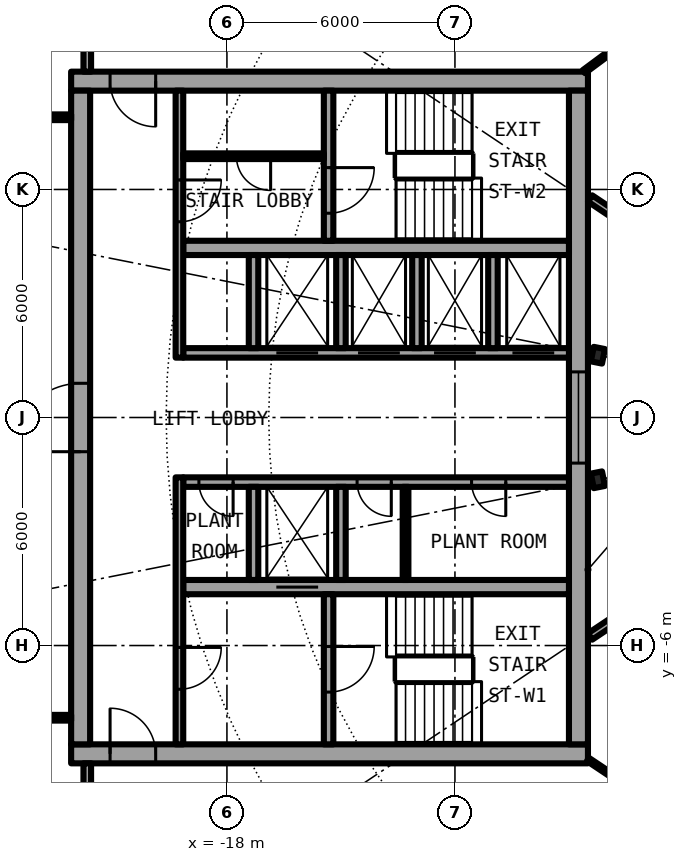
"""IFC4 building model, lengths in metres.
Left out: names, types, materials, properties, quantities, classifications, styles, units other than length and angle.
Written with IfcOpenShell. Run it as: python <this file> out.ifc"""

import sys

from ifc_helpers import new_model, si_unit, direction, frame, frame_2d, origin, origin_2d, place, context, subcontext, project, spatial, rectangle, i_section, extrude, element, fill, save


model = new_model("IFC4")
c1 = context("Model", 3, precision=1e-05, world=origin(), true_north=direction((0.0, 1.0)))
c2 = subcontext(c1, "Body", "Model", "MODEL_VIEW")
j1 = project(units=[si_unit("LENGTHUNIT", "METRE"), si_unit("PLANEANGLEUNIT", "RADIAN")], contexts=[c1])
p1 = place(None, origin())
s1 = spatial("IfcSite", under=j1, at=p1, CompositionType="ELEMENT")
p2 = place(p1, origin())
s2 = spatial("IfcBuilding", under=s1, at=p2, CompositionType="ELEMENT")
p3 = place(p2, frame((0.0, 0.0, 167.7)))
s3 = spatial("IfcBuildingStorey", under=s2, at=p3, CompositionType="ELEMENT", Elevation=167.7)
for number, where, z_axis, x_axis in (
    (1, (-8.239, 1.639, 0.0), (0.0, 0.0, 1.0), (-0.981, 0.195, 0.0)),
    (2, (-8.239, -1.639, 0.0), (0.0, 0.0, 1.0), (-0.981, -0.195, 0.0)),
):
    element("IfcColumn", number, at=place(p3, frame(where, z_axis=z_axis, x_axis=x_axis)), inside=s3, PredefinedType="COLUMN", context=c2, shape_type="SweptSolid", body=[
        extrude(i_section(OverallWidth=0.3, OverallDepth=0.39, WebThickness=0.011, FlangeThickness=0.019, FilletRadius=0.027, at=origin_2d()), origin(), (0.0, 0.0, 1.0), 3.05),
    ])
p4 = place(p3, frame((-22.1, -8.85, 0.0), z_axis=(0.0, 0.0, 1.0), x_axis=(1.0, 0.0, 0.0)))
e3 = element("IfcWall", 3, at=p4, inside=s3, PredefinedType="SHEAR", context=c2, shape_type="SweptSolid", body=[
    extrude(rectangle(XDim=13.6, YDim=0.5, at=frame_2d((6.8, 0.0))), origin(), (0.0, 0.0, 1.0), 3.05),
])
p5 = place(p4, frame((1.025, 0.0, 0.0)))
e4 = element("IfcOpeningElement", 4, at=p5, cuts=e3, PredefinedType="OPENING", context=c2, shape_type="SweptSolid", body=[
    extrude(rectangle(XDim=1.2, YDim=2.3, at=frame_2d((0.6, 1.15))), frame((0.0, 0.26, 0.0), z_axis=(0.0, -1.0, 0.0), x_axis=(1.0, 0.0, 0.0)), (0.0, 0.0, 1.0), 0.52),
])
p6 = place(p3, frame((-8.5, 8.85, 0.0), z_axis=(0.0, 0.0, 1.0), x_axis=(-1.0, 0.0, 0.0)))
e5 = element("IfcWall", 5, at=p6, inside=s3, PredefinedType="SHEAR", context=c2, shape_type="SweptSolid", body=[
    extrude(rectangle(XDim=13.6, YDim=0.5, at=frame_2d((6.8, 0.0))), origin(), (0.0, 0.0, 1.0), 3.05),
])
p7 = place(p6, frame((11.375, 0.0, 0.0)))
e6 = element("IfcOpeningElement", 6, at=p7, cuts=e5, PredefinedType="OPENING", context=c2, shape_type="SweptSolid", body=[
    extrude(rectangle(XDim=1.2, YDim=2.3, at=frame_2d((0.6, 1.15))), frame((0.0, 0.26, 0.0), z_axis=(0.0, -1.0, 0.0), x_axis=(1.0, 0.0, 0.0)), (0.0, 0.0, 1.0), 0.52),
])
p8 = place(p3, frame((-21.85, -8.6, 0.0), z_axis=(0.0, 0.0, 1.0), x_axis=(0.0, 1.0, 0.0)))
e7 = element("IfcWall", 7, at=p8, inside=s3, PredefinedType="SHEAR", context=c2, shape_type="SweptSolid", body=[
    extrude(rectangle(XDim=17.2, YDim=0.5, at=frame_2d((8.6, 0.0))), origin(), (0.0, 0.0, 1.0), 3.05),
])
p9 = place(p8, frame((7.7, 0.0, 0.0)))
e8 = element("IfcOpeningElement", 8, at=p9, cuts=e7, PredefinedType="OPENING", context=c2, shape_type="SweptSolid", body=[
    extrude(rectangle(XDim=1.8, YDim=2.3, at=frame_2d((0.9, 1.15))), frame((0.0, 0.26, 0.0), z_axis=(0.0, -1.0, 0.0), x_axis=(1.0, 0.0, 0.0)), (0.0, 0.0, 1.0), 0.52),
])
p10 = place(p3, frame((-8.75, 8.6, 0.0), z_axis=(0.0, 0.0, 1.0), x_axis=(0.0, -1.0, 0.0)))
e9 = element("IfcWall", 9, at=p10, inside=s3, PredefinedType="SHEAR", context=c2, shape_type="SweptSolid", body=[
    extrude(rectangle(XDim=17.2, YDim=0.5, at=frame_2d((8.6, 0.0))), origin(), (0.0, 0.0, 1.0), 3.05),
])
p11 = place(p10, frame((7.4, 0.0, 0.1)))
e10 = element("IfcOpeningElement", 10, at=p11, cuts=e9, PredefinedType="OPENING", context=c2, shape_type="SweptSolid", body=[
    extrude(rectangle(XDim=2.4, YDim=2.2, at=frame_2d((1.2, 1.1))), frame((0.0, 0.26, 0.0), z_axis=(0.0, -1.0, 0.0), x_axis=(1.0, 0.0, 0.0)), (0.0, 0.0, 1.0), 0.52),
])
p12 = place(p3, frame((-9.0, -1.7, 0.0), z_axis=(0.0, 0.0, 1.0), x_axis=(-1.0, 0.0, 0.0)))
e11 = element("IfcWall", 11, at=p12, inside=s3, PredefinedType="SHEAR", context=c2, shape_type="SweptSolid", body=[
    extrude(rectangle(XDim=10.15, YDim=0.25, at=frame_2d((5.075, 0.0))), origin(), (0.0, 0.0, 1.0), 3.05),
])
p13 = place(p12, frame((1.663, 0.0, 0.0)))
e12 = element("IfcOpeningElement", 12, at=p13, cuts=e11, PredefinedType="OPENING", context=c2, shape_type="SweptSolid", body=[
    extrude(rectangle(XDim=0.9, YDim=2.3, at=frame_2d((0.45, 1.15))), frame((0.0, 0.135, 0.0), z_axis=(0.0, -1.0, 0.0), x_axis=(1.0, 0.0, 0.0)), (0.0, 0.0, 1.0), 0.27),
])
p14 = place(p12, frame((4.675, 0.0, 0.0)))
e13 = element("IfcOpeningElement", 13, at=p14, cuts=e11, PredefinedType="OPENING", context=c2, shape_type="SweptSolid", body=[
    extrude(rectangle(XDim=0.9, YDim=2.3, at=frame_2d((0.45, 1.15))), frame((0.0, 0.135, 0.0), z_axis=(0.0, -1.0, 0.0), x_axis=(1.0, 0.0, 0.0)), (0.0, 0.0, 1.0), 0.27),
])
p15 = place(p12, frame((8.837, 0.0, 0.0)))
e14 = element("IfcOpeningElement", 14, at=p15, cuts=e11, PredefinedType="OPENING", context=c2, shape_type="SweptSolid", body=[
    extrude(rectangle(XDim=0.9, YDim=2.3, at=frame_2d((0.45, 1.15))), frame((0.0, 0.135, 0.0), z_axis=(0.0, -1.0, 0.0), x_axis=(1.0, 0.0, 0.0)), (0.0, 0.0, 1.0), 0.27),
])
p16 = place(p3, frame((-9.0, -4.462, 0.0), z_axis=(0.0, 0.0, 1.0), x_axis=(-1.0, 0.0, 0.0)))
e15 = element("IfcWall", 15, at=p16, inside=s3, PredefinedType="SHEAR", context=c2, shape_type="SweptSolid", body=[
    extrude(rectangle(XDim=10.15, YDim=0.375, at=frame_2d((5.075, 0.0))), origin(), (0.0, 0.0, 1.0), 3.05),
])
p17 = place(p16, frame((6.6, 0.0, 0.0)))
e16 = element("IfcOpeningElement", 16, at=p17, cuts=e15, PredefinedType="OPENING", context=c2, shape_type="SweptSolid", body=[
    extrude(rectangle(XDim=1.1, YDim=2.3, at=frame_2d((0.55, 1.15))), frame((0.0, 0.198, 0.0), z_axis=(0.0, -1.0, 0.0), x_axis=(1.0, 0.0, 0.0)), (0.0, 0.0, 1.0), 0.395),
])
p18 = place(p3, frame((-15.325, -4.65, 0.0), z_axis=(0.0, 0.0, 1.0), x_axis=(0.0, -1.0, 0.0)))
e17 = element("IfcWall", 17, at=p18, inside=s3, PredefinedType="SHEAR", context=c2, shape_type="SweptSolid", body=[
    extrude(rectangle(XDim=3.95, YDim=0.25, at=frame_2d((1.975, 0.0))), origin(), (0.0, 0.0, 1.0), 3.05),
])
p19 = place(p18, frame((1.375, 0.0, 0.0)))
e18 = element("IfcOpeningElement", 18, at=p19, cuts=e17, PredefinedType="OPENING", context=c2, shape_type="SweptSolid", body=[
    extrude(rectangle(XDim=1.2, YDim=2.3, at=frame_2d((0.6, 1.15))), frame((0.0, 0.135, 0.0), z_axis=(0.0, -1.0, 0.0), x_axis=(1.0, 0.0, 0.0)), (0.0, 0.0, 1.0), 0.27),
])
for number, where, z_axis, x_axis in (
    (19, (-15.0, -1.825, 0.0), (0.0, 0.0, 1.0), (0.0, -1.0, 0.0)),
    (20, (-17.3, -1.825, 0.0), (0.0, 0.0, 1.0), (0.0, -1.0, 0.0)),
):
    element("IfcWall", number, at=place(p3, frame(where, z_axis=z_axis, x_axis=x_axis)), inside=s3, PredefinedType="SOLIDWALL", context=c2, shape_type="SweptSolid", body=[
        extrude(rectangle(XDim=2.45, YDim=0.25, at=frame_2d((1.225, 0.0))), origin(), (0.0, 0.0, 1.0), 2.7),
    ])
p20 = place(p3, frame((-19.25, -1.575, 0.0), z_axis=(0.0, 0.0, 1.0), x_axis=(0.0, -1.0, 0.0)))
e21 = element("IfcWall", 21, at=p20, inside=s3, PredefinedType="SOLIDWALL", context=c2, shape_type="SweptSolid", body=[
    extrude(rectangle(XDim=7.025, YDim=0.2, at=frame_2d((3.513, 0.0))), origin(), (0.0, 0.0, 1.0), 2.7),
])
p21 = place(p20, frame((4.475, 0.0, 0.0)))
e22 = element("IfcOpeningElement", 22, at=p21, cuts=e21, PredefinedType="OPENING", context=c2, shape_type="SweptSolid", body=[
    extrude(rectangle(XDim=1.1, YDim=2.3, at=frame_2d((0.55, 1.15))), frame((0.0, 0.11, 0.0), z_axis=(0.0, -1.0, 0.0), x_axis=(1.0, 0.0, 0.0)), (0.0, 0.0, 1.0), 0.22),
])
p22 = place(p3, frame((-9.0, 1.7, 0.0), z_axis=(0.0, 0.0, 1.0), x_axis=(-1.0, 0.0, 0.0)))
e23 = element("IfcWall", 23, at=p22, inside=s3, PredefinedType="SHEAR", context=c2, shape_type="SweptSolid", body=[
    extrude(rectangle(XDim=10.15, YDim=0.25, at=frame_2d((5.075, 0.0))), origin(), (0.0, 0.0, 1.0), 3.05),
])
p23 = place(p22, frame((0.387, 0.0, 0.0)))
e24 = element("IfcOpeningElement", 24, at=p23, cuts=e23, PredefinedType="OPENING", context=c2, shape_type="SweptSolid", body=[
    extrude(rectangle(XDim=1.1, YDim=2.3, at=frame_2d((0.55, 1.15))), frame((0.0, 0.135, 0.0), z_axis=(0.0, -1.0, 0.0), x_axis=(1.0, 0.0, 0.0)), (0.0, 0.0, 1.0), 0.27),
])
p24 = place(p22, frame((2.45, 0.0, 0.0)))
e25 = element("IfcOpeningElement", 25, at=p24, cuts=e23, PredefinedType="OPENING", context=c2, shape_type="SweptSolid", body=[
    extrude(rectangle(XDim=1.1, YDim=2.3, at=frame_2d((0.55, 1.15))), frame((0.0, 0.135, 0.0), z_axis=(0.0, -1.0, 0.0), x_axis=(1.0, 0.0, 0.0)), (0.0, 0.0, 1.0), 0.27),
])
p25 = place(p22, frame((4.45, 0.0, 0.0)))
e26 = element("IfcOpeningElement", 26, at=p25, cuts=e23, PredefinedType="OPENING", context=c2, shape_type="SweptSolid", body=[
    extrude(rectangle(XDim=1.1, YDim=2.3, at=frame_2d((0.55, 1.15))), frame((0.0, 0.135, 0.0), z_axis=(0.0, -1.0, 0.0), x_axis=(1.0, 0.0, 0.0)), (0.0, 0.0, 1.0), 0.27),
])
p26 = place(p22, frame((6.6, 0.0, 0.0)))
e27 = element("IfcOpeningElement", 27, at=p26, cuts=e23, PredefinedType="OPENING", context=c2, shape_type="SweptSolid", body=[
    extrude(rectangle(XDim=1.1, YDim=2.3, at=frame_2d((0.55, 1.15))), frame((0.0, 0.135, 0.0), z_axis=(0.0, -1.0, 0.0), x_axis=(1.0, 0.0, 0.0)), (0.0, 0.0, 1.0), 0.27),
])
p27 = place(p3, frame((-9.0, 4.462, 0.0), z_axis=(0.0, 0.0, 1.0), x_axis=(-1.0, 0.0, 0.0)))
e28 = element("IfcWall", 28, at=p27, inside=s3, PredefinedType="SHEAR", context=c2, shape_type="SweptSolid", body=[
    extrude(rectangle(XDim=10.15, YDim=0.375, at=frame_2d((5.075, 0.0))), origin(), (0.0, 0.0, 1.0), 3.05),
])
p28 = place(p3, frame((-15.325, 8.6, 0.0), z_axis=(0.0, 0.0, 1.0), x_axis=(0.0, -1.0, 0.0)))
e29 = element("IfcWall", 29, at=p28, inside=s3, PredefinedType="SHEAR", context=c2, shape_type="SweptSolid", body=[
    extrude(rectangle(XDim=3.95, YDim=0.25, at=frame_2d((1.975, 0.0))), origin(), (0.0, 0.0, 1.0), 3.05),
])
p29 = place(p28, frame((2.025, 0.0, 0.0)))
e30 = element("IfcOpeningElement", 30, at=p29, cuts=e29, PredefinedType="OPENING", context=c2, shape_type="SweptSolid", body=[
    extrude(rectangle(XDim=1.2, YDim=2.3, at=frame_2d((0.6, 1.15))), frame((0.0, 0.135, 0.0), z_axis=(0.0, -1.0, 0.0), x_axis=(1.0, 0.0, 0.0)), (0.0, 0.0, 1.0), 0.27),
])
for number, where, z_axis, x_axis in (
    (31, (-15.0, 1.825, 0.0), (0.0, 0.0, 1.0), (0.0, 1.0, 0.0)),
    (32, (-17.3, 1.825, 0.0), (0.0, 0.0, 1.0), (0.0, 1.0, 0.0)),
):
    element("IfcWall", number, at=place(p3, frame(where, z_axis=z_axis, x_axis=x_axis)), inside=s3, PredefinedType="SOLIDWALL", context=c2, shape_type="SweptSolid", body=[
        extrude(rectangle(XDim=2.45, YDim=0.25, at=frame_2d((1.225, 0.0))), origin(), (0.0, 0.0, 1.0), 2.7),
    ])
p30 = place(p3, frame((-19.25, 8.6, 0.0), z_axis=(0.0, 0.0, 1.0), x_axis=(0.0, -1.0, 0.0)))
e33 = element("IfcWall", 33, at=p30, inside=s3, PredefinedType="SOLIDWALL", context=c2, shape_type="SweptSolid", body=[
    extrude(rectangle(XDim=7.025, YDim=0.2, at=frame_2d((3.513, 0.0))), origin(), (0.0, 0.0, 1.0), 2.7),
])
p31 = place(p30, frame((2.35, 0.0, 0.0)))
e34 = element("IfcOpeningElement", 34, at=p31, cuts=e33, PredefinedType="OPENING", context=c2, shape_type="SweptSolid", body=[
    extrude(rectangle(XDim=1.1, YDim=2.3, at=frame_2d((0.55, 1.15))), frame((0.0, 0.11, 0.0), z_axis=(0.0, -1.0, 0.0), x_axis=(1.0, 0.0, 0.0)), (0.0, 0.0, 1.0), 0.22),
])
for number, where, z_axis, x_axis in (
    (35, (-11.0, 1.825, 0.0), (0.0, 0.0, 1.0), (0.0, 1.0, 0.0)),
    (36, (-13.0, 1.825, 0.0), (0.0, 0.0, 1.0), (0.0, 1.0, 0.0)),
):
    element("IfcWall", number, at=place(p3, frame(where, z_axis=z_axis, x_axis=x_axis)), inside=s3, PredefinedType="SOLIDWALL", context=c2, shape_type="SweptSolid", body=[
        extrude(rectangle(XDim=2.45, YDim=0.25, at=frame_2d((1.225, 0.0))), origin(), (0.0, 0.0, 1.0), 2.7),
    ])
p32 = place(p3, frame((-13.3, -1.825, 0.0), z_axis=(0.0, 0.0, 1.0), x_axis=(0.0, -1.0, 0.0)))
e37 = element("IfcWall", 37, at=p32, inside=s3, PredefinedType="PARTITIONING", context=c2, shape_type="SweptSolid", body=[
    extrude(rectangle(XDim=2.45, YDim=0.15, at=frame_2d((1.225, 0.0))), origin(), (0.0, 0.0, 1.0), 2.7),
])
p33 = place(p3, frame((-15.45, 6.875, 0.0), z_axis=(0.0, 0.0, 1.0), x_axis=(-1.0, 0.0, 0.0)))
e38 = element("IfcWall", 38, at=p33, inside=s3, PredefinedType="PARTITIONING", context=c2, shape_type="SweptSolid", body=[
    extrude(rectangle(XDim=3.7, YDim=0.15, at=frame_2d((1.85, 0.0))), origin(), (0.0, 0.0, 1.0), 2.7),
])
p34 = place(p33, frame((1.4, 0.0, 0.0)))
e39 = element("IfcOpeningElement", 39, at=p34, cuts=e38, PredefinedType="OPENING", context=c2, shape_type="SweptSolid", body=[
    extrude(rectangle(XDim=0.9, YDim=2.3, at=frame_2d((0.45, 1.15))), frame((0.0, 0.085, 0.0), z_axis=(0.0, -1.0, 0.0), x_axis=(1.0, 0.0, 0.0)), (0.0, 0.0, 1.0), 0.17),
])
for number, where, z_axis, x_axis in (
    (40, (-22.1, 7.9, 0.0), (0.0, 0.0, 1.0), (-1.0, 0.0, 0.0)),
    (41, (-22.1, -7.9, 0.0), (0.0, 0.0, 1.0), (-1.0, 0.0, 0.0)),
):
    element("IfcWall", number, at=place(p3, frame(where, z_axis=z_axis, x_axis=x_axis)), inside=s3, PredefinedType="PARTITIONING", context=c2, shape_type="SweptSolid", body=[
        extrude(rectangle(XDim=2.84, YDim=0.15, at=frame_2d((1.42, 0.0))), origin(), (0.0, 0.0, 1.0), 2.7),
    ])
p35 = place(p3, frame((-8.5, -8.998, 0.0), z_axis=(0.0, 0.0, 1.0), x_axis=(0.831531456502, -0.55547766548, 0.0)))
e42 = element("IfcWall", 42, at=p35, inside=s3, PredefinedType="PARTITIONING", context=c2, shape_type="SweptSolid", body=[
    extrude(rectangle(XDim=3.333, YDim=0.1, at=frame_2d((1.666, 0.0))), origin(), (0.0, 0.0, 1.0), 2.7),
])
p36 = place(p3, frame((-6.513, -4.472, 0.0), z_axis=(0.0, 0.0, 1.0), x_axis=(-0.83133816625, -0.555766905579, 0.0)))
e43 = element("IfcWall", 43, at=p36, inside=s3, PredefinedType="PARTITIONING", context=c2, shape_type="SweptSolid", body=[
    extrude(rectangle(XDim=2.323, YDim=0.2, at=frame_2d((1.162, 0.0))), origin(), (0.0, 0.0, 1.0), 2.7),
])
p37 = place(p3, frame((-10.616, 12.875, 0.0), z_axis=(0.0, 0.0, 1.0), x_axis=(0.636045954217, -0.771651180342, 0.0)))
e44 = element("IfcWall", 44, at=p37, inside=s3, PredefinedType="PARTITIONING", context=c2, shape_type="SweptSolid", body=[
    extrude(rectangle(XDim=8.968, YDim=0.1, at=frame_2d((4.484, 0.0))), origin(), (0.0, 0.0, 1.0), 2.7),
])
p38 = place(p37, frame((1.667, 0.0, 0.0)))
e45 = element("IfcOpeningElement", 45, at=p38, cuts=e44, PredefinedType="OPENING", context=c2, shape_type="SweptSolid", body=[
    extrude(rectangle(XDim=0.9, YDim=2.3, at=frame_2d((0.45, 1.15))), frame((0.0, 0.06, 0.0), z_axis=(0.0, -1.0, 0.0), x_axis=(1.0, 0.0, 0.0)), (0.0, 0.0, 1.0), 0.12),
])
p39 = place(p37, frame((6.151, 0.0, 0.0)))
e46 = element("IfcOpeningElement", 46, at=p39, cuts=e44, PredefinedType="OPENING", context=c2, shape_type="SweptSolid", body=[
    extrude(rectangle(XDim=0.9, YDim=2.3, at=frame_2d((0.45, 1.15))), frame((0.0, 0.06, 0.0), z_axis=(0.0, -1.0, 0.0), x_axis=(1.0, 0.0, 0.0)), (0.0, 0.0, 1.0), 0.12),
])
p40 = place(p3, frame((-6.513, 4.472, 0.0), z_axis=(0.0, 0.0, 1.0), x_axis=(-0.83133816625, 0.555766905579, 0.0)))
e47 = element("IfcWall", 47, at=p40, inside=s3, PredefinedType="PARTITIONING", context=c2, shape_type="SweptSolid", body=[
    extrude(rectangle(XDim=2.323, YDim=0.2, at=frame_2d((1.162, 0.0))), origin(), (0.0, 0.0, 1.0), 2.7),
])
p41 = place(p3, frame((-8.607, 9.1, 0.0), z_axis=(0.0, 0.0, 1.0), x_axis=(0.803199066515, 0.595710718007, 0.0)))
e48 = element("IfcWall", 48, at=p41, inside=s3, PredefinedType="PARTITIONING", context=c2, shape_type="SweptSolid", body=[
    extrude(rectangle(XDim=0.858, YDim=0.1, at=frame_2d((0.429, 0.0))), origin(), (0.0, 0.0, 1.0), 2.7),
])
for number, where, z_axis, x_axis in (
    (49, (-21.675, -10.85, 0.0), (0.0, 0.0, 1.0), (0.0, 1.0, 0.0)),
    (50, (-21.675, 9.1, 0.0), (0.0, 0.0, 1.0), (0.0, 1.0, 0.0)),
):
    element("IfcWall", number, at=place(p3, frame(where, z_axis=z_axis, x_axis=x_axis)), inside=s3, PredefinedType="PARTITIONING", context=c2, shape_type="SweptSolid", body=[
        extrude(rectangle(XDim=1.75, YDim=0.2, at=frame_2d((0.875, 0.0))), origin(), (0.0, 0.0, 1.0), 2.7),
    ])
p42 = place(p17, origin())
e51 = element("IfcDoor", 51, at=p42, inside=s3, OperationType="DOUBLE_DOOR_SLIDING", PredefinedType="DOOR", context=c2, shape_type="SweptSolid", body=[
    extrude(rectangle(XDim=1.1, YDim=2.3, at=frame_2d((0.55, 1.15))), frame((0.0, 0.025, 0.0), z_axis=(0.0, -1.0, 0.0), x_axis=(1.0, 0.0, 0.0)), (0.0, 0.0, 1.0), 0.05),
])
fill(e16, e51)
p43 = place(p23, origin())
e52 = element("IfcDoor", 52, at=p43, inside=s3, OperationType="DOUBLE_DOOR_SLIDING", PredefinedType="DOOR", context=c2, shape_type="SweptSolid", body=[
    extrude(rectangle(XDim=1.1, YDim=2.3, at=frame_2d((0.55, 1.15))), frame((0.0, 0.025, 0.0), z_axis=(0.0, -1.0, 0.0), x_axis=(1.0, 0.0, 0.0)), (0.0, 0.0, 1.0), 0.05),
])
fill(e24, e52)
p44 = place(p24, origin())
e53 = element("IfcDoor", 53, at=p44, inside=s3, OperationType="DOUBLE_DOOR_SLIDING", PredefinedType="DOOR", context=c2, shape_type="SweptSolid", body=[
    extrude(rectangle(XDim=1.1, YDim=2.3, at=frame_2d((0.55, 1.15))), frame((0.0, 0.025, 0.0), z_axis=(0.0, -1.0, 0.0), x_axis=(1.0, 0.0, 0.0)), (0.0, 0.0, 1.0), 0.05),
])
fill(e25, e53)
p45 = place(p25, origin())
e54 = element("IfcDoor", 54, at=p45, inside=s3, OperationType="DOUBLE_DOOR_SLIDING", PredefinedType="DOOR", context=c2, shape_type="SweptSolid", body=[
    extrude(rectangle(XDim=1.1, YDim=2.3, at=frame_2d((0.55, 1.15))), frame((0.0, 0.025, 0.0), z_axis=(0.0, -1.0, 0.0), x_axis=(1.0, 0.0, 0.0)), (0.0, 0.0, 1.0), 0.05),
])
fill(e26, e54)
p46 = place(p26, origin())
e55 = element("IfcDoor", 55, at=p46, inside=s3, OperationType="DOUBLE_DOOR_SLIDING", PredefinedType="DOOR", context=c2, shape_type="SweptSolid", body=[
    extrude(rectangle(XDim=1.1, YDim=2.3, at=frame_2d((0.55, 1.15))), frame((0.0, 0.025, 0.0), z_axis=(0.0, -1.0, 0.0), x_axis=(1.0, 0.0, 0.0)), (0.0, 0.0, 1.0), 0.05),
])
fill(e27, e55)
p47 = place(p13, origin())
e56 = element("IfcDoor", 56, at=p47, inside=s3, OperationType="SINGLE_SWING_RIGHT", PredefinedType="DOOR", context=c2, shape_type="SweptSolid", body=[
    extrude(rectangle(XDim=0.9, YDim=2.3, at=frame_2d((0.45, 1.15))), frame((0.0, 0.025, 0.0), z_axis=(0.0, -1.0, 0.0), x_axis=(1.0, 0.0, 0.0)), (0.0, 0.0, 1.0), 0.05),
])
fill(e12, e56)
p48 = place(p14, origin())
e57 = element("IfcDoor", 57, at=p48, inside=s3, OperationType="SINGLE_SWING_LEFT", PredefinedType="DOOR", context=c2, shape_type="SweptSolid", body=[
    extrude(rectangle(XDim=0.9, YDim=2.3, at=frame_2d((0.45, 1.15))), frame((0.0, 0.025, 0.0), z_axis=(0.0, -1.0, 0.0), x_axis=(1.0, 0.0, 0.0)), (0.0, 0.0, 1.0), 0.05),
])
fill(e13, e57)
p49 = place(p15, origin())
e58 = element("IfcDoor", 58, at=p49, inside=s3, OperationType="SINGLE_SWING_LEFT", PredefinedType="DOOR", context=c2, shape_type="SweptSolid", body=[
    extrude(rectangle(XDim=0.9, YDim=2.3, at=frame_2d((0.45, 1.15))), frame((0.0, 0.025, 0.0), z_axis=(0.0, -1.0, 0.0), x_axis=(1.0, 0.0, 0.0)), (0.0, 0.0, 1.0), 0.05),
])
fill(e14, e58)
p50 = place(p34, origin())
e59 = element("IfcDoor", 59, at=p50, inside=s3, OperationType="SINGLE_SWING_LEFT", PredefinedType="DOOR", context=c2, shape_type="SweptSolid", body=[
    extrude(rectangle(XDim=0.9, YDim=2.3, at=frame_2d((0.45, 1.15))), frame((0.0, 0.025, 0.0), z_axis=(0.0, -1.0, 0.0), x_axis=(1.0, 0.0, 0.0)), (0.0, 0.0, 1.0), 0.05),
])
fill(e39, e59)
p51 = place(p19, origin())
e60 = element("IfcDoor", 60, at=p51, inside=s3, OperationType="SINGLE_SWING_LEFT", PredefinedType="DOOR", context=c2, shape_type="SweptSolid", body=[
    extrude(rectangle(XDim=1.2, YDim=2.3, at=frame_2d((0.6, 1.15))), frame((0.0, 0.025, 0.0), z_axis=(0.0, -1.0, 0.0), x_axis=(1.0, 0.0, 0.0)), (0.0, 0.0, 1.0), 0.05),
])
fill(e18, e60)
p52 = place(p29, origin())
e61 = element("IfcDoor", 61, at=p52, inside=s3, OperationType="SINGLE_SWING_LEFT", PredefinedType="DOOR", context=c2, shape_type="SweptSolid", body=[
    extrude(rectangle(XDim=1.2, YDim=2.3, at=frame_2d((0.6, 1.15))), frame((0.0, 0.025, 0.0), z_axis=(0.0, -1.0, 0.0), x_axis=(1.0, 0.0, 0.0)), (0.0, 0.0, 1.0), 0.05),
])
fill(e30, e61)
p53 = place(p21, origin())
e62 = element("IfcDoor", 62, at=p53, inside=s3, OperationType="SINGLE_SWING_LEFT", PredefinedType="DOOR", context=c2, shape_type="SweptSolid", body=[
    extrude(rectangle(XDim=1.1, YDim=2.3, at=frame_2d((0.55, 1.15))), frame((0.0, 0.025, 0.0), z_axis=(0.0, -1.0, 0.0), x_axis=(1.0, 0.0, 0.0)), (0.0, 0.0, 1.0), 0.05),
])
fill(e22, e62)
p54 = place(p31, origin())
e63 = element("IfcDoor", 63, at=p54, inside=s3, OperationType="SINGLE_SWING_RIGHT", PredefinedType="DOOR", context=c2, shape_type="SweptSolid", body=[
    extrude(rectangle(XDim=1.1, YDim=2.3, at=frame_2d((0.55, 1.15))), frame((0.0, 0.025, 0.0), z_axis=(0.0, -1.0, 0.0), x_axis=(1.0, 0.0, 0.0)), (0.0, 0.0, 1.0), 0.05),
])
fill(e34, e63)
p55 = place(p5, origin())
e64 = element("IfcDoor", 64, at=p55, inside=s3, OperationType="SINGLE_SWING_RIGHT", PredefinedType="DOOR", context=c2, shape_type="SweptSolid", body=[
    extrude(rectangle(XDim=1.2, YDim=2.3, at=frame_2d((0.6, 1.15))), frame((0.0, 0.025, 0.0), z_axis=(0.0, -1.0, 0.0), x_axis=(1.0, 0.0, 0.0)), (0.0, 0.0, 1.0), 0.05),
])
fill(e4, e64)
p56 = place(p7, origin())
e65 = element("IfcDoor", 65, at=p56, inside=s3, OperationType="SINGLE_SWING_LEFT", PredefinedType="DOOR", context=c2, shape_type="SweptSolid", body=[
    extrude(rectangle(XDim=1.2, YDim=2.3, at=frame_2d((0.6, 1.15))), frame((0.0, 0.025, 0.0), z_axis=(0.0, -1.0, 0.0), x_axis=(1.0, 0.0, 0.0)), (0.0, 0.0, 1.0), 0.05),
])
fill(e6, e65)
p57 = place(p9, origin())
e66 = element("IfcDoor", 66, at=p57, inside=s3, OperationType="SINGLE_SWING_LEFT", PredefinedType="DOOR", context=c2, shape_type="SweptSolid", body=[
    extrude(rectangle(XDim=1.8, YDim=2.3, at=frame_2d((0.9, 1.15))), frame((0.0, 0.025, 0.0), z_axis=(0.0, -1.0, 0.0), x_axis=(1.0, 0.0, 0.0)), (0.0, 0.0, 1.0), 0.05),
])
fill(e8, e66)
p58 = place(p11, origin())
e67 = element("IfcWindow", 67, at=p58, inside=s3, PartitioningType="SINGLE_PANEL", PredefinedType="WINDOW", context=c2, shape_type="SweptSolid", body=[
    extrude(rectangle(XDim=2.4, YDim=2.2, at=frame_2d((1.2, 1.1))), frame((0.0, 0.03, 0.0), z_axis=(0.0, -1.0, 0.0), x_axis=(1.0, 0.0, 0.0)), (0.0, 0.0, 1.0), 0.06),
])
fill(e10, e67)
save(model, sys.argv[1])
